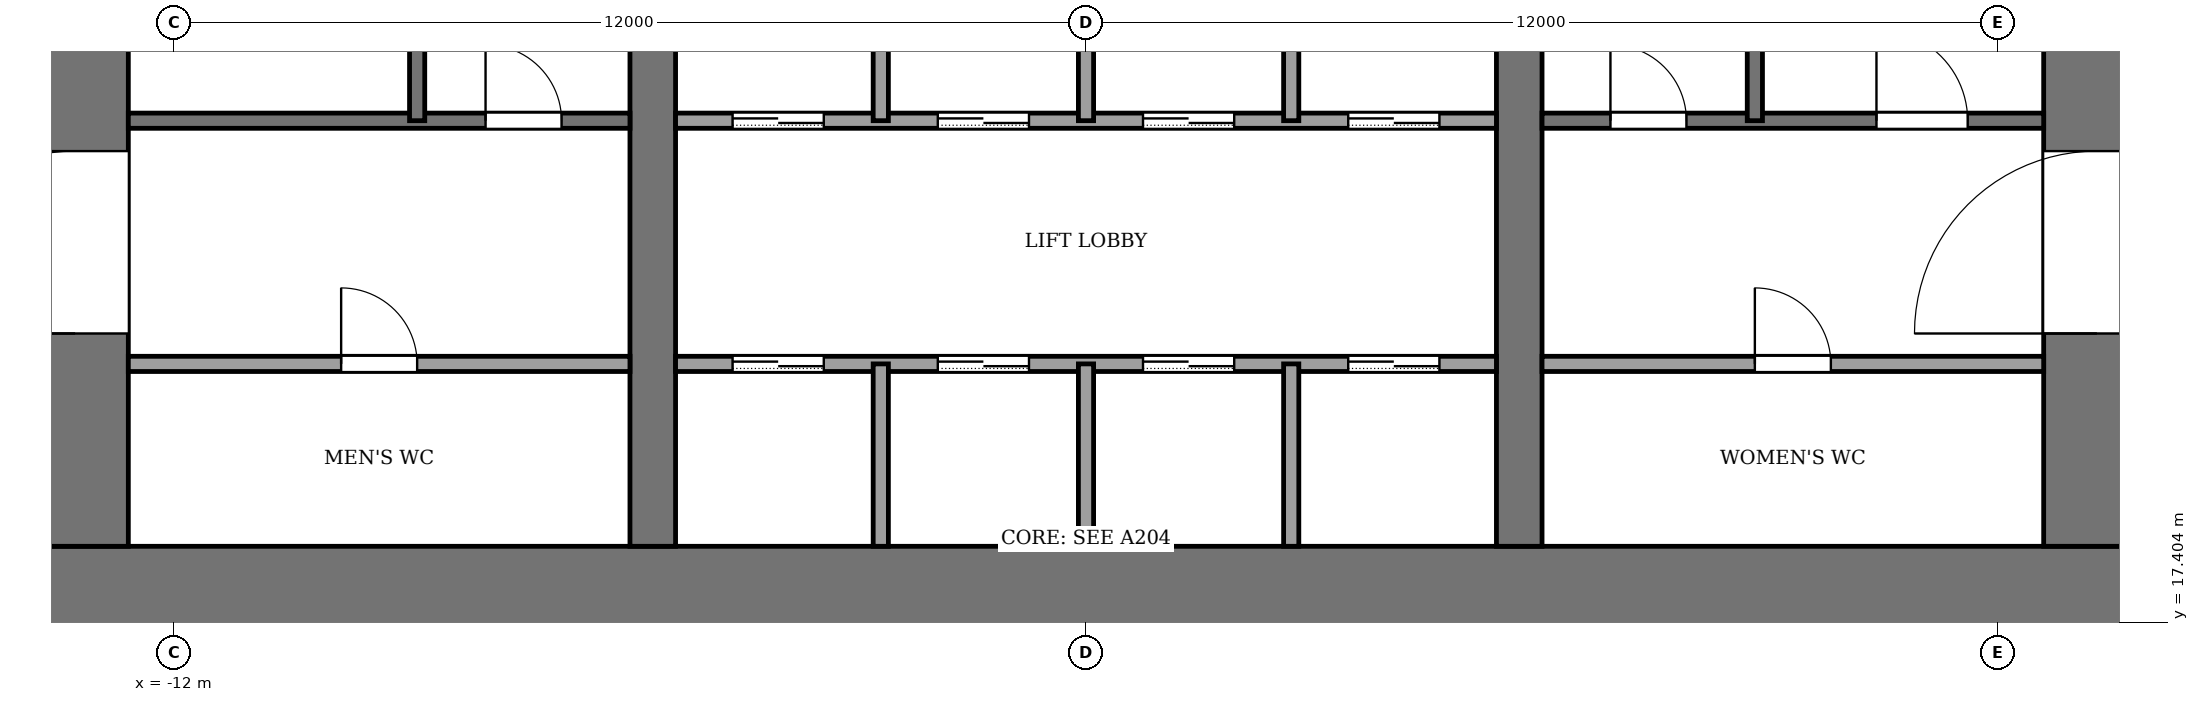
"""IFC4 building model, lengths in metres.
Left out: names, types, materials, properties, quantities, classifications, styles, units other than length and angle.
Written with IfcOpenShell. Run it as: python <this file> out.ifc"""

import sys

from ifc_helpers import new_model, si_unit, direction, frame, frame_2d, origin, place, context, subcontext, project, spatial, rectangle, extrude, element, fill, save


model = new_model("IFC4")
c1 = context("Model", 3, precision=1e-05, world=origin(), true_north=direction((0.0, 1.0)))
c2 = subcontext(c1, "Body", "Model", "MODEL_VIEW")
j1 = project(units=[si_unit("LENGTHUNIT", "METRE"), si_unit("PLANEANGLEUNIT", "RADIAN")], contexts=[c1])
p1 = place(None, origin())
s1 = spatial("IfcSite", under=j1, at=p1, CompositionType="ELEMENT")
p2 = place(p1, origin())
s2 = spatial("IfcBuilding", under=s1, at=p2, CompositionType="ELEMENT")
p3 = place(p2, frame((0.0, 0.0, 14.0)))
s3 = spatial("IfcBuildingStorey", under=s2, at=p3, CompositionType="ELEMENT", Elevation=14.0)
p4 = place(p3, frame((-14.0, 17.7, -0.13), z_axis=(0.0, 0.0, 1.0), x_axis=(1.0, 0.0, 0.0)))
e1 = element("IfcWall", 1, at=p4, inside=s3, PredefinedType="SHEAR", context=c2, shape_type="SweptSolid", body=[
    extrude(rectangle(XDim=28.0, YDim=1.4, at=frame_2d((14.0, 0.0))), origin(), (0.0, 0.0, 1.0), 4.0),
])
p5 = place(p3, frame((-13.3, 18.4, -0.13), z_axis=(0.0, 0.0, 1.0), x_axis=(0.0, 1.0, 0.0)))
e2 = element("IfcWall", 2, at=p5, inside=s3, PredefinedType="SHEAR", context=c2, shape_type="SweptSolid", body=[
    extrude(rectangle(XDim=19.2, YDim=1.4, at=frame_2d((9.6, 0.0))), origin(), (0.0, 0.0, 1.0), 4.0),
])
p6 = place(p5, frame((2.8, 0.0, 0.13)))
e3 = element("IfcOpeningElement", 3, at=p6, cuts=e2, PredefinedType="OPENING", context=c2, shape_type="SweptSolid", body=[
    extrude(rectangle(XDim=2.4, YDim=2.4, at=frame_2d((1.2, 1.2))), frame((0.0, 0.71, 0.0), z_axis=(0.0, -1.0, 0.0), x_axis=(1.0, 0.0, 0.0)), (0.0, 0.0, 1.0), 1.42),
])
p7 = place(p5, frame((13.4, 0.0, 0.13)))
e4 = element("IfcOpeningElement", 4, at=p7, cuts=e2, PredefinedType="OPENING", context=c2, shape_type="SweptSolid", body=[
    extrude(rectangle(XDim=1.4, YDim=2.2, at=frame_2d((0.7, 1.1))), frame((0.0, 0.71, 0.0), z_axis=(0.0, -1.0, 0.0), x_axis=(1.0, 0.0, 0.0)), (0.0, 0.0, 1.0), 1.42),
])
p8 = place(p3, frame((13.3, 18.4, -0.13), z_axis=(0.0, 0.0, 1.0), x_axis=(0.0, 1.0, 0.0)))
e5 = element("IfcWall", 5, at=p8, inside=s3, PredefinedType="SHEAR", context=c2, shape_type="SweptSolid", body=[
    extrude(rectangle(XDim=19.2, YDim=1.4, at=frame_2d((9.6, 0.0))), origin(), (0.0, 0.0, 1.0), 4.0),
])
p9 = place(p8, frame((2.8, 0.0, 0.13)))
e6 = element("IfcOpeningElement", 6, at=p9, cuts=e5, PredefinedType="OPENING", context=c2, shape_type="SweptSolid", body=[
    extrude(rectangle(XDim=2.4, YDim=2.4, at=frame_2d((1.2, 1.2))), frame((0.0, 0.71, 0.0), z_axis=(0.0, -1.0, 0.0), x_axis=(1.0, 0.0, 0.0)), (0.0, 0.0, 1.0), 1.42),
])
p10 = place(p8, frame((13.3, 0.0, 0.13)))
e7 = element("IfcOpeningElement", 7, at=p10, cuts=e5, PredefinedType="OPENING", context=c2, shape_type="SweptSolid", body=[
    extrude(rectangle(XDim=2.4, YDim=2.4, at=frame_2d((1.2, 1.2))), frame((0.0, 0.71, 0.0), z_axis=(0.0, -1.0, 0.0), x_axis=(1.0, 0.0, 0.0)), (0.0, 0.0, 1.0), 1.42),
])
p11 = place(p3, frame((-5.7, 18.4, -0.13), z_axis=(0.0, 0.0, 1.0), x_axis=(0.0, 1.0, 0.0)))
e8 = element("IfcWall", 8, at=p11, inside=s3, PredefinedType="SHEAR", context=c2, shape_type="SweptSolid", body=[
    extrude(rectangle(XDim=19.2, YDim=0.6, at=frame_2d((9.6, 0.0))), origin(), (0.0, 0.0, 1.0), 4.0),
])
p12 = place(p11, frame((8.35, 0.0, 0.13)))
e9 = element("IfcOpeningElement", 9, at=p12, cuts=e8, PredefinedType="OPENING", context=c2, shape_type="SweptSolid", body=[
    extrude(rectangle(XDim=0.9, YDim=2.1, at=frame_2d((0.45, 1.05))), frame((0.0, 0.31, 0.0), z_axis=(0.0, -1.0, 0.0), x_axis=(1.0, 0.0, 0.0)), (0.0, 0.0, 1.0), 0.62),
])
p13 = place(p3, frame((5.7, 18.4, -0.13), z_axis=(0.0, 0.0, 1.0), x_axis=(0.0, 1.0, 0.0)))
e10 = element("IfcWall", 10, at=p13, inside=s3, PredefinedType="SHEAR", context=c2, shape_type="SweptSolid", body=[
    extrude(rectangle(XDim=19.2, YDim=0.6, at=frame_2d((9.6, 0.0))), origin(), (0.0, 0.0, 1.0), 4.0),
])
p14 = place(p13, frame((13.3, 0.0, 0.13)))
e11 = element("IfcOpeningElement", 11, at=p14, cuts=e10, PredefinedType="OPENING", context=c2, shape_type="SweptSolid", body=[
    extrude(rectangle(XDim=2.4, YDim=2.4, at=frame_2d((1.2, 1.2))), frame((0.0, 0.31, 0.0), z_axis=(0.0, -1.0, 0.0), x_axis=(1.0, 0.0, 0.0)), (0.0, 0.0, 1.0), 0.62),
])
p15 = place(p3, frame((-12.6, 20.8, 0.0), z_axis=(0.0, 0.0, 1.0), x_axis=(1.0, 0.0, 0.0)))
e12 = element("IfcWall", 12, at=p15, inside=s3, PredefinedType="PARTITIONING", context=c2, shape_type="SweptSolid", body=[
    extrude(rectangle(XDim=6.6, YDim=0.2, at=frame_2d((3.3, 0.0))), origin(), (0.0, 0.0, 1.0), 3.87),
])
p16 = place(p15, frame((2.8, 0.0, 0.0)))
e13 = element("IfcOpeningElement", 13, at=p16, cuts=e12, PredefinedType="OPENING", context=c2, shape_type="SweptSolid", body=[
    extrude(rectangle(XDim=1.0, YDim=2.1, at=frame_2d((0.5, 1.05))), frame((0.0, 0.11, 0.0), z_axis=(0.0, -1.0, 0.0), x_axis=(1.0, 0.0, 0.0)), (0.0, 0.0, 1.0), 0.22),
])
p17 = place(p3, frame((-5.4, 20.8, 0.0), z_axis=(0.0, 0.0, 1.0), x_axis=(1.0, 0.0, 0.0)))
e14 = element("IfcWall", 14, at=p17, inside=s3, PredefinedType="PARTITIONING", context=c2, shape_type="SweptSolid", body=[
    extrude(rectangle(XDim=10.8, YDim=0.2, at=frame_2d((5.4, 0.0))), origin(), (0.0, 0.0, 1.0), 3.87),
])
p18 = place(p17, frame((0.75, 0.0, 0.0)))
e15 = element("IfcOpeningElement", 15, at=p18, cuts=e14, PredefinedType="OPENING", context=c2, shape_type="SweptSolid", body=[
    extrude(rectangle(XDim=1.2, YDim=2.2, at=frame_2d((0.6, 1.1))), frame((0.0, 0.11, 0.0), z_axis=(0.0, -1.0, 0.0), x_axis=(1.0, 0.0, 0.0)), (0.0, 0.0, 1.0), 0.22),
])
p19 = place(p17, frame((3.45, 0.0, 0.0)))
e16 = element("IfcOpeningElement", 16, at=p19, cuts=e14, PredefinedType="OPENING", context=c2, shape_type="SweptSolid", body=[
    extrude(rectangle(XDim=1.2, YDim=2.2, at=frame_2d((0.6, 1.1))), frame((0.0, 0.11, 0.0), z_axis=(0.0, -1.0, 0.0), x_axis=(1.0, 0.0, 0.0)), (0.0, 0.0, 1.0), 0.22),
])
p20 = place(p17, frame((6.15, 0.0, 0.0)))
e17 = element("IfcOpeningElement", 17, at=p20, cuts=e14, PredefinedType="OPENING", context=c2, shape_type="SweptSolid", body=[
    extrude(rectangle(XDim=1.2, YDim=2.2, at=frame_2d((0.6, 1.1))), frame((0.0, 0.11, 0.0), z_axis=(0.0, -1.0, 0.0), x_axis=(1.0, 0.0, 0.0)), (0.0, 0.0, 1.0), 0.22),
])
p21 = place(p17, frame((8.85, 0.0, 0.0)))
e18 = element("IfcOpeningElement", 18, at=p21, cuts=e14, PredefinedType="OPENING", context=c2, shape_type="SweptSolid", body=[
    extrude(rectangle(XDim=1.2, YDim=2.2, at=frame_2d((0.6, 1.1))), frame((0.0, 0.11, 0.0), z_axis=(0.0, -1.0, 0.0), x_axis=(1.0, 0.0, 0.0)), (0.0, 0.0, 1.0), 0.22),
])
p22 = place(p3, frame((6.0, 20.8, 0.0), z_axis=(0.0, 0.0, 1.0), x_axis=(1.0, 0.0, 0.0)))
e19 = element("IfcWall", 19, at=p22, inside=s3, PredefinedType="PARTITIONING", context=c2, shape_type="SweptSolid", body=[
    extrude(rectangle(XDim=6.6, YDim=0.2, at=frame_2d((3.3, 0.0))), origin(), (0.0, 0.0, 1.0), 3.87),
])
p23 = place(p22, frame((2.8, 0.0, 0.0)))
e20 = element("IfcOpeningElement", 20, at=p23, cuts=e19, PredefinedType="OPENING", context=c2, shape_type="SweptSolid", body=[
    extrude(rectangle(XDim=1.0, YDim=2.1, at=frame_2d((0.5, 1.05))), frame((0.0, 0.11, 0.0), z_axis=(0.0, -1.0, 0.0), x_axis=(1.0, 0.0, 0.0)), (0.0, 0.0, 1.0), 0.22),
])
p24 = place(p3, frame((-12.6, 24.0, 0.0), z_axis=(0.0, 0.0, 1.0), x_axis=(1.0, 0.0, 0.0)))
e21 = element("IfcWall", 21, at=p24, inside=s3, PredefinedType="PARTITIONING", context=c2, shape_type="SweptSolid", body=[
    extrude(rectangle(XDim=6.6, YDim=0.2, at=frame_2d((3.3, 0.0))), origin(), (0.0, 0.0, 1.0), 3.87),
])
p25 = place(p24, frame((4.7, 0.0, 0.0)))
e22 = element("IfcOpeningElement", 22, at=p25, cuts=e21, PredefinedType="OPENING", context=c2, shape_type="SweptSolid", body=[
    extrude(rectangle(XDim=1.0, YDim=2.1, at=frame_2d((0.5, 1.05))), frame((0.0, 0.11, 0.0), z_axis=(0.0, -1.0, 0.0), x_axis=(1.0, 0.0, 0.0)), (0.0, 0.0, 1.0), 0.22),
])
p26 = place(p3, frame((-5.4, 24.0, 0.0), z_axis=(0.0, 0.0, 1.0), x_axis=(1.0, 0.0, 0.0)))
e23 = element("IfcWall", 23, at=p26, inside=s3, PredefinedType="PARTITIONING", context=c2, shape_type="SweptSolid", body=[
    extrude(rectangle(XDim=10.8, YDim=0.2, at=frame_2d((5.4, 0.0))), origin(), (0.0, 0.0, 1.0), 3.87),
])
p27 = place(p26, frame((0.75, 0.0, 0.0)))
e24 = element("IfcOpeningElement", 24, at=p27, cuts=e23, PredefinedType="OPENING", context=c2, shape_type="SweptSolid", body=[
    extrude(rectangle(XDim=1.2, YDim=2.2, at=frame_2d((0.6, 1.1))), frame((0.0, 0.11, 0.0), z_axis=(0.0, -1.0, 0.0), x_axis=(1.0, 0.0, 0.0)), (0.0, 0.0, 1.0), 0.22),
])
p28 = place(p26, frame((3.45, 0.0, 0.0)))
e25 = element("IfcOpeningElement", 25, at=p28, cuts=e23, PredefinedType="OPENING", context=c2, shape_type="SweptSolid", body=[
    extrude(rectangle(XDim=1.2, YDim=2.2, at=frame_2d((0.6, 1.1))), frame((0.0, 0.11, 0.0), z_axis=(0.0, -1.0, 0.0), x_axis=(1.0, 0.0, 0.0)), (0.0, 0.0, 1.0), 0.22),
])
p29 = place(p26, frame((6.15, 0.0, 0.0)))
e26 = element("IfcOpeningElement", 26, at=p29, cuts=e23, PredefinedType="OPENING", context=c2, shape_type="SweptSolid", body=[
    extrude(rectangle(XDim=1.2, YDim=2.2, at=frame_2d((0.6, 1.1))), frame((0.0, 0.11, 0.0), z_axis=(0.0, -1.0, 0.0), x_axis=(1.0, 0.0, 0.0)), (0.0, 0.0, 1.0), 0.22),
])
p30 = place(p26, frame((8.85, 0.0, 0.0)))
e27 = element("IfcOpeningElement", 27, at=p30, cuts=e23, PredefinedType="OPENING", context=c2, shape_type="SweptSolid", body=[
    extrude(rectangle(XDim=1.2, YDim=2.2, at=frame_2d((0.6, 1.1))), frame((0.0, 0.11, 0.0), z_axis=(0.0, -1.0, 0.0), x_axis=(1.0, 0.0, 0.0)), (0.0, 0.0, 1.0), 0.22),
])
p31 = place(p3, frame((6.0, 24.0, 0.0), z_axis=(0.0, 0.0, 1.0), x_axis=(1.0, 0.0, 0.0)))
e28 = element("IfcWall", 28, at=p31, inside=s3, PredefinedType="PARTITIONING", context=c2, shape_type="SweptSolid", body=[
    extrude(rectangle(XDim=6.6, YDim=0.2, at=frame_2d((3.3, 0.0))), origin(), (0.0, 0.0, 1.0), 3.87),
])
p32 = place(p31, frame((0.9, 0.0, 0.0)))
e29 = element("IfcOpeningElement", 29, at=p32, cuts=e28, PredefinedType="OPENING", context=c2, shape_type="SweptSolid", body=[
    extrude(rectangle(XDim=1.0, YDim=2.1, at=frame_2d((0.5, 1.05))), frame((0.0, 0.11, 0.0), z_axis=(0.0, -1.0, 0.0), x_axis=(1.0, 0.0, 0.0)), (0.0, 0.0, 1.0), 0.22),
])
p33 = place(p31, frame((4.4, 0.0, 0.0)))
e30 = element("IfcOpeningElement", 30, at=p33, cuts=e28, PredefinedType="OPENING", context=c2, shape_type="SweptSolid", body=[
    extrude(rectangle(XDim=1.2, YDim=2.2, at=frame_2d((0.6, 1.1))), frame((0.0, 0.11, 0.0), z_axis=(0.0, -1.0, 0.0), x_axis=(1.0, 0.0, 0.0)), (0.0, 0.0, 1.0), 0.22),
])
p34 = place(p3, frame((-8.8, 24.0, 0.0), z_axis=(0.0, 0.0, 1.0), x_axis=(0.0, 1.0, 0.0)))
e31 = element("IfcWall", 31, at=p34, inside=s3, PredefinedType="PARTITIONING", context=c2, shape_type="SweptSolid", body=[
    extrude(rectangle(XDim=7.4, YDim=0.2, at=frame_2d((3.7, 0.0))), origin(), (0.0, 0.0, 1.0), 3.87),
])
p35 = place(p3, frame((-2.7, 18.4, 0.0), z_axis=(0.0, 0.0, 1.0), x_axis=(0.0, 1.0, 0.0)))
e32 = element("IfcWall", 32, at=p35, inside=s3, PredefinedType="PARTITIONING", context=c2, shape_type="SweptSolid", body=[
    extrude(rectangle(XDim=2.4, YDim=0.2, at=frame_2d((1.2, 0.0))), origin(), (0.0, 0.0, 1.0), 3.87),
])
p36 = place(p3, frame((-2.7, 24.0, 0.0), z_axis=(0.0, 0.0, 1.0), x_axis=(0.0, 1.0, 0.0)))
e33 = element("IfcWall", 33, at=p36, inside=s3, PredefinedType="PARTITIONING", context=c2, shape_type="SweptSolid", body=[
    extrude(rectangle(XDim=2.4, YDim=0.2, at=frame_2d((1.2, 0.0))), origin(), (0.0, 0.0, 1.0), 3.87),
])
p37 = place(p3, frame((0.0, 18.4, 0.0), z_axis=(0.0, 0.0, 1.0), x_axis=(0.0, 1.0, 0.0)))
e34 = element("IfcWall", 34, at=p37, inside=s3, PredefinedType="PARTITIONING", context=c2, shape_type="SweptSolid", body=[
    extrude(rectangle(XDim=2.4, YDim=0.2, at=frame_2d((1.2, 0.0))), origin(), (0.0, 0.0, 1.0), 3.87),
])
p38 = place(p3, frame((0.0, 24.0, 0.0), z_axis=(0.0, 0.0, 1.0), x_axis=(0.0, 1.0, 0.0)))
e35 = element("IfcWall", 35, at=p38, inside=s3, PredefinedType="PARTITIONING", context=c2, shape_type="SweptSolid", body=[
    extrude(rectangle(XDim=2.4, YDim=0.2, at=frame_2d((1.2, 0.0))), origin(), (0.0, 0.0, 1.0), 3.87),
])
p39 = place(p3, frame((2.7, 18.4, 0.0), z_axis=(0.0, 0.0, 1.0), x_axis=(0.0, 1.0, 0.0)))
e36 = element("IfcWall", 36, at=p39, inside=s3, PredefinedType="PARTITIONING", context=c2, shape_type="SweptSolid", body=[
    extrude(rectangle(XDim=2.4, YDim=0.2, at=frame_2d((1.2, 0.0))), origin(), (0.0, 0.0, 1.0), 3.87),
])
p40 = place(p3, frame((2.7, 24.0, 0.0), z_axis=(0.0, 0.0, 1.0), x_axis=(0.0, 1.0, 0.0)))
e37 = element("IfcWall", 37, at=p40, inside=s3, PredefinedType="PARTITIONING", context=c2, shape_type="SweptSolid", body=[
    extrude(rectangle(XDim=2.4, YDim=0.2, at=frame_2d((1.2, 0.0))), origin(), (0.0, 0.0, 1.0), 3.87),
])
p41 = place(p3, frame((8.8, 24.0, 0.0), z_axis=(0.0, 0.0, 1.0), x_axis=(0.0, 1.0, 0.0)))
e38 = element("IfcWall", 38, at=p41, inside=s3, PredefinedType="PARTITIONING", context=c2, shape_type="SweptSolid", body=[
    extrude(rectangle(XDim=7.4, YDim=0.2, at=frame_2d((3.7, 0.0))), origin(), (0.0, 0.0, 1.0), 3.87),
])
p42 = place(p18, origin())
e39 = element("IfcDoor", 39, at=p42, inside=s3, OperationType="SLIDING_TO_LEFT", PredefinedType="DOOR", context=c2, shape_type="SweptSolid", body=[
    extrude(rectangle(XDim=1.2, YDim=2.2, at=frame_2d((0.6, 1.1))), frame((0.0, 0.025, 0.0), z_axis=(0.0, -1.0, 0.0), x_axis=(1.0, 0.0, 0.0)), (0.0, 0.0, 1.0), 0.05),
])
fill(e15, e39)
p43 = place(p19, origin())
e40 = element("IfcDoor", 40, at=p43, inside=s3, OperationType="SLIDING_TO_LEFT", PredefinedType="DOOR", context=c2, shape_type="SweptSolid", body=[
    extrude(rectangle(XDim=1.2, YDim=2.2, at=frame_2d((0.6, 1.1))), frame((0.0, 0.025, 0.0), z_axis=(0.0, -1.0, 0.0), x_axis=(1.0, 0.0, 0.0)), (0.0, 0.0, 1.0), 0.05),
])
fill(e16, e40)
p44 = place(p20, origin())
e41 = element("IfcDoor", 41, at=p44, inside=s3, OperationType="SLIDING_TO_LEFT", PredefinedType="DOOR", context=c2, shape_type="SweptSolid", body=[
    extrude(rectangle(XDim=1.2, YDim=2.2, at=frame_2d((0.6, 1.1))), frame((0.0, 0.025, 0.0), z_axis=(0.0, -1.0, 0.0), x_axis=(1.0, 0.0, 0.0)), (0.0, 0.0, 1.0), 0.05),
])
fill(e17, e41)
p45 = place(p21, origin())
e42 = element("IfcDoor", 42, at=p45, inside=s3, OperationType="SLIDING_TO_LEFT", PredefinedType="DOOR", context=c2, shape_type="SweptSolid", body=[
    extrude(rectangle(XDim=1.2, YDim=2.2, at=frame_2d((0.6, 1.1))), frame((0.0, 0.025, 0.0), z_axis=(0.0, -1.0, 0.0), x_axis=(1.0, 0.0, 0.0)), (0.0, 0.0, 1.0), 0.05),
])
fill(e18, e42)
p46 = place(p27, origin())
e43 = element("IfcDoor", 43, at=p46, inside=s3, OperationType="SLIDING_TO_LEFT", PredefinedType="DOOR", context=c2, shape_type="SweptSolid", body=[
    extrude(rectangle(XDim=1.2, YDim=2.2, at=frame_2d((0.6, 1.1))), frame((0.0, 0.025, 0.0), z_axis=(0.0, -1.0, 0.0), x_axis=(1.0, 0.0, 0.0)), (0.0, 0.0, 1.0), 0.05),
])
fill(e24, e43)
p47 = place(p28, origin())
e44 = element("IfcDoor", 44, at=p47, inside=s3, OperationType="SLIDING_TO_LEFT", PredefinedType="DOOR", context=c2, shape_type="SweptSolid", body=[
    extrude(rectangle(XDim=1.2, YDim=2.2, at=frame_2d((0.6, 1.1))), frame((0.0, 0.025, 0.0), z_axis=(0.0, -1.0, 0.0), x_axis=(1.0, 0.0, 0.0)), (0.0, 0.0, 1.0), 0.05),
])
fill(e25, e44)
p48 = place(p29, origin())
e45 = element("IfcDoor", 45, at=p48, inside=s3, OperationType="SLIDING_TO_LEFT", PredefinedType="DOOR", context=c2, shape_type="SweptSolid", body=[
    extrude(rectangle(XDim=1.2, YDim=2.2, at=frame_2d((0.6, 1.1))), frame((0.0, 0.025, 0.0), z_axis=(0.0, -1.0, 0.0), x_axis=(1.0, 0.0, 0.0)), (0.0, 0.0, 1.0), 0.05),
])
fill(e26, e45)
p49 = place(p30, origin())
e46 = element("IfcDoor", 46, at=p49, inside=s3, OperationType="SLIDING_TO_LEFT", PredefinedType="DOOR", context=c2, shape_type="SweptSolid", body=[
    extrude(rectangle(XDim=1.2, YDim=2.2, at=frame_2d((0.6, 1.1))), frame((0.0, 0.025, 0.0), z_axis=(0.0, -1.0, 0.0), x_axis=(1.0, 0.0, 0.0)), (0.0, 0.0, 1.0), 0.05),
])
fill(e27, e46)
p50 = place(p16, origin())
e47 = element("IfcDoor", 47, at=p50, inside=s3, OperationType="SINGLE_SWING_LEFT", PredefinedType="DOOR", context=c2, shape_type="SweptSolid", body=[
    extrude(rectangle(XDim=1.0, YDim=2.1, at=frame_2d((0.5, 1.05))), frame((0.0, 0.025, 0.0), z_axis=(0.0, -1.0, 0.0), x_axis=(1.0, 0.0, 0.0)), (0.0, 0.0, 1.0), 0.05),
])
fill(e13, e47)
p51 = place(p23, origin())
e48 = element("IfcDoor", 48, at=p51, inside=s3, OperationType="SINGLE_SWING_RIGHT", PredefinedType="DOOR", context=c2, shape_type="SweptSolid", body=[
    extrude(rectangle(XDim=1.0, YDim=2.1, at=frame_2d((0.5, 1.05))), frame((0.0, 0.025, 0.0), z_axis=(0.0, -1.0, 0.0), x_axis=(1.0, 0.0, 0.0)), (0.0, 0.0, 1.0), 0.05),
])
fill(e20, e48)
p52 = place(p25, origin())
e49 = element("IfcDoor", 49, at=p52, inside=s3, OperationType="SINGLE_SWING_RIGHT", PredefinedType="DOOR", context=c2, shape_type="SweptSolid", body=[
    extrude(rectangle(XDim=1.0, YDim=2.1, at=frame_2d((0.5, 1.05))), frame((0.0, 0.025, 0.0), z_axis=(0.0, -1.0, 0.0), x_axis=(1.0, 0.0, 0.0)), (0.0, 0.0, 1.0), 0.05),
])
fill(e22, e49)
p53 = place(p32, origin())
e50 = element("IfcDoor", 50, at=p53, inside=s3, OperationType="SINGLE_SWING_LEFT", PredefinedType="DOOR", context=c2, shape_type="SweptSolid", body=[
    extrude(rectangle(XDim=1.0, YDim=2.1, at=frame_2d((0.5, 1.05))), frame((0.0, 0.025, 0.0), z_axis=(0.0, -1.0, 0.0), x_axis=(1.0, 0.0, 0.0)), (0.0, 0.0, 1.0), 0.05),
])
fill(e29, e50)
p54 = place(p33, origin())
e51 = element("IfcDoor", 51, at=p54, inside=s3, OperationType="SINGLE_SWING_LEFT", PredefinedType="DOOR", context=c2, shape_type="SweptSolid", body=[
    extrude(rectangle(XDim=1.2, YDim=2.2, at=frame_2d((0.6, 1.1))), frame((0.0, 0.025, 0.0), z_axis=(0.0, -1.0, 0.0), x_axis=(1.0, 0.0, 0.0)), (0.0, 0.0, 1.0), 0.05),
])
fill(e30, e51)
p55 = place(p6, origin())
e52 = element("IfcDoor", 52, at=p55, inside=s3, OperationType="DOUBLE_DOOR_SINGLE_SWING", PredefinedType="DOOR", context=c2, shape_type="SweptSolid", body=[
    extrude(rectangle(XDim=2.4, YDim=2.4, at=frame_2d((1.2, 1.2))), frame((0.0, 0.025, 0.0), z_axis=(0.0, -1.0, 0.0), x_axis=(1.0, 0.0, 0.0)), (0.0, 0.0, 1.0), 0.05),
])
fill(e3, e52)
p56 = place(p9, origin())
e53 = element("IfcDoor", 53, at=p56, inside=s3, OperationType="DOUBLE_DOOR_SINGLE_SWING", PredefinedType="DOOR", context=c2, shape_type="SweptSolid", body=[
    extrude(rectangle(XDim=2.4, YDim=2.4, at=frame_2d((1.2, 1.2))), frame((0.0, 0.025, 0.0), z_axis=(0.0, -1.0, 0.0), x_axis=(1.0, 0.0, 0.0)), (0.0, 0.0, 1.0), 0.05),
])
fill(e6, e53)
save(model, sys.argv[1])
